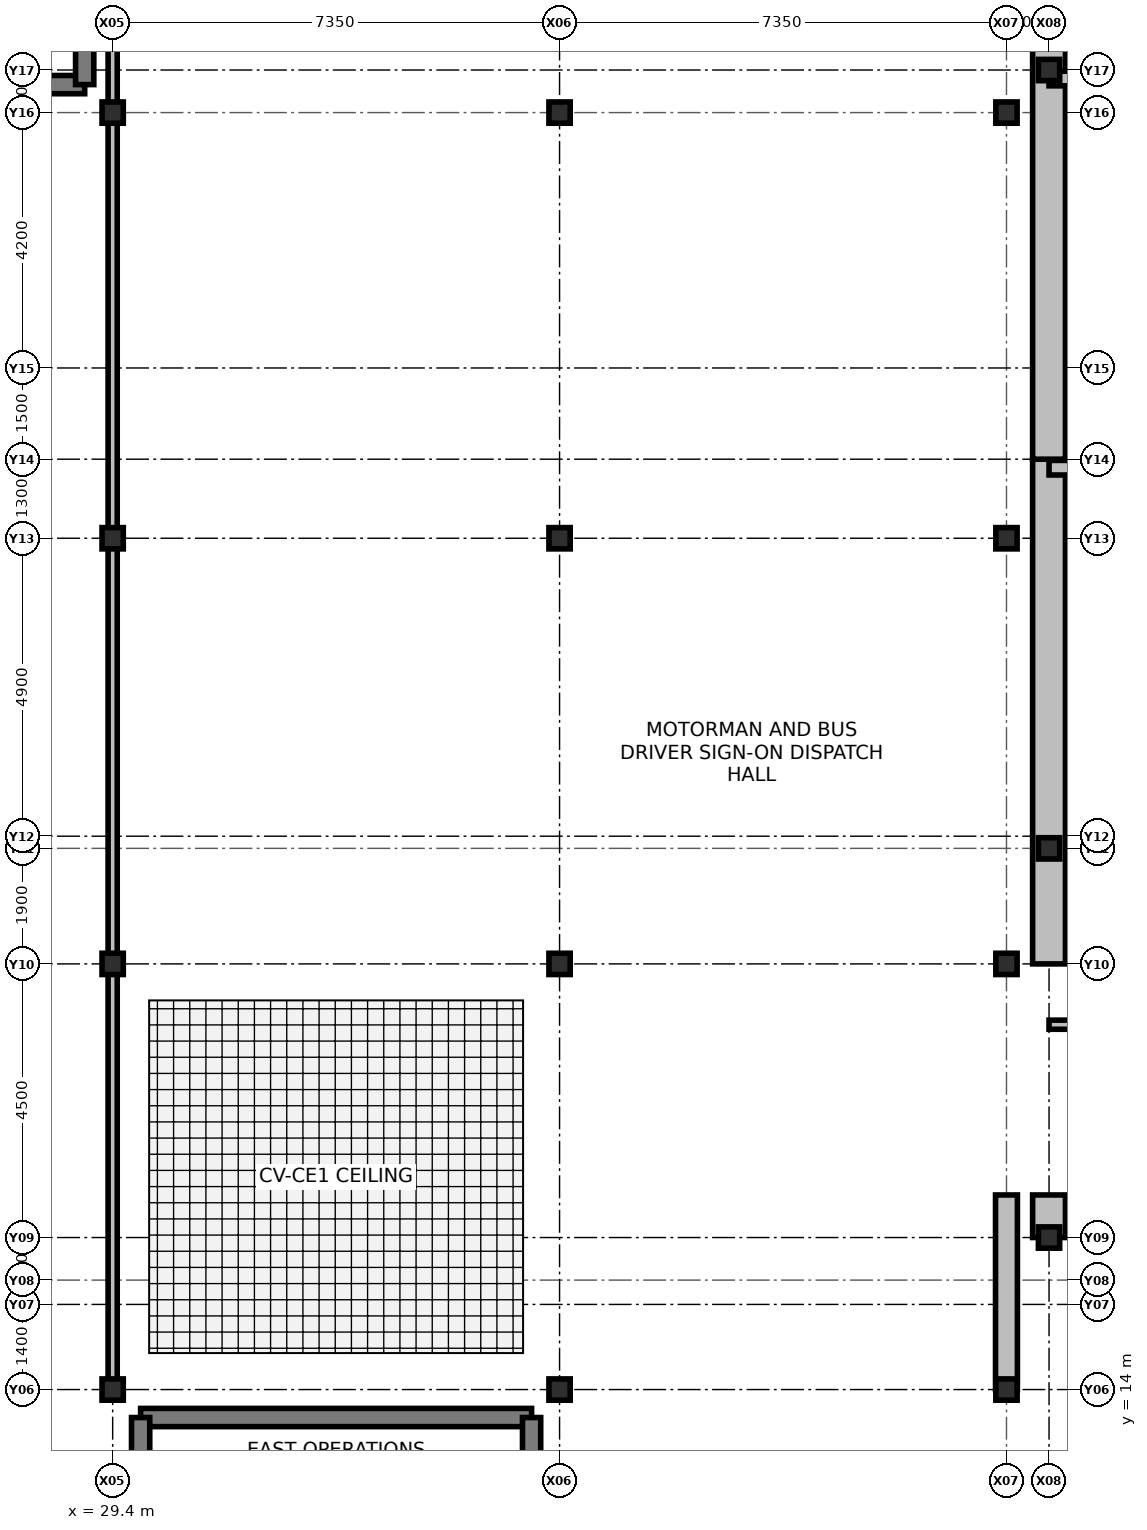
"""IFC4 building model, lengths in metres.
Left out: names, types, materials, properties, quantities, classifications, styles, units other than length and angle.
Written with IfcOpenShell. Run it as: python <this file> out.ifc"""

import sys

from ifc_helpers import new_model, si_unit, direction, frame, frame_2d, origin, origin_2d, place, context, subcontext, project, spatial, rectangle, i_section, extrude, element, fill, save


model = new_model("IFC4")
c1 = context("Model", 3, precision=1e-05, world=origin(), true_north=direction((0.0, 1.0)))
c2 = subcontext(c1, "Body", "Model", "MODEL_VIEW")
j1 = project(units=[si_unit("LENGTHUNIT", "METRE"), si_unit("PLANEANGLEUNIT", "RADIAN")], contexts=[c1])
p1 = place(None, origin())
s1 = spatial("IfcSite", under=j1, at=p1, CompositionType="ELEMENT")
p2 = place(p1, origin())
s2 = spatial("IfcBuilding", under=s1, at=p2, CompositionType="ELEMENT")
p3 = place(p2, frame((0.0, 0.0, 6.0)))
s3 = spatial("IfcBuildingStorey", under=s2, at=p3, CompositionType="ELEMENT", Elevation=6.0)
for number, where, z_axis, x_axis in (
    (1, (44.8, 16.5, 0.0), (0.0, 0.0, 1.0), (1.0, 0.0, 0.0)),
    (2, (44.8, 22.9, 0.0), (0.0, 0.0, 1.0), (1.0, 0.0, 0.0)),
):
    element("IfcColumn", number, at=place(p3, frame(where, z_axis=z_axis, x_axis=x_axis)), inside=s3, PredefinedType="COLUMN", context=c2, shape_type="SweptSolid", body=[
        extrude(i_section(OverallWidth=0.35, OverallDepth=0.35, WebThickness=0.012, FlangeThickness=0.019, at=origin_2d()), origin(), (0.0, 0.0, 1.0), 5.1),
    ])
p4 = place(p3, frame((44.8, 35.7, 0.0), z_axis=(0.0, 0.0, 1.0), x_axis=(1.0, 0.0, 0.0)))
e3 = element("IfcColumn", 3, at=p4, inside=s3, PredefinedType="COLUMN", context=c2, shape_type="SweptSolid", body=[
    extrude(i_section(OverallWidth=0.35, OverallDepth=0.35, WebThickness=0.012, FlangeThickness=0.019, at=origin_2d()), origin(), (0.0, 0.0, 1.0), 9.3),
])
for number, where, z_axis, x_axis in (
    (4, (29.4, 14.0, 0.0), (0.0, 0.0, 1.0), (1.0, 0.0, 0.0)),
    (5, (29.4, 21.0, 0.0), (0.0, 0.0, 1.0), (1.0, 0.0, 0.0)),
    (6, (29.4, 28.0, 0.0), (0.0, 0.0, 1.0), (1.0, 0.0, 0.0)),
    (7, (29.4, 35.0, 0.0), (0.0, 0.0, 1.0), (1.0, 0.0, 0.0)),
    (8, (36.75, 14.0, 0.0), (0.0, 0.0, 1.0), (1.0, 0.0, 0.0)),
    (9, (36.75, 21.0, 0.0), (0.0, 0.0, 1.0), (1.0, 0.0, 0.0)),
    (10, (36.75, 28.0, 0.0), (0.0, 0.0, 1.0), (1.0, 0.0, 0.0)),
    (11, (36.75, 35.0, 0.0), (0.0, 0.0, 1.0), (1.0, 0.0, 0.0)),
    (12, (44.1, 14.0, 0.0), (0.0, 0.0, 1.0), (1.0, 0.0, 0.0)),
    (13, (44.1, 21.0, 0.0), (0.0, 0.0, 1.0), (1.0, 0.0, 0.0)),
    (14, (44.1, 28.0, 0.0), (0.0, 0.0, 1.0), (1.0, 0.0, 0.0)),
    (15, (44.1, 35.0, 0.0), (0.0, 0.0, 1.0), (1.0, 0.0, 0.0)),
):
    element("IfcColumn", number, at=place(p3, frame(where, z_axis=z_axis, x_axis=x_axis)), inside=s3, PredefinedType="COLUMN", context=c2, shape_type="SweptSolid", body=[
        extrude(i_section(OverallWidth=0.35, OverallDepth=0.35, WebThickness=0.012, FlangeThickness=0.019, at=origin_2d()), origin(), (0.0, 0.0, 1.0), 5.1),
    ])
p5 = place(p3, frame((44.8, 16.5, 0.0), z_axis=(0.0, 0.0, 1.0), x_axis=(0.0, 1.0, 0.0)))
e16 = element("IfcWall", 16, at=p5, inside=s3, PredefinedType="SOLIDWALL", context=c2, shape_type="SweptSolid", body=[
    extrude(rectangle(XDim=0.7, YDim=0.54, at=frame_2d((0.35, 0.0))), origin(), (0.0, 0.0, 1.0), 2.58),
])
p6 = place(p3, frame((44.8, 21.0, 0.0), z_axis=(0.0, 0.0, 1.0), x_axis=(0.0, 1.0, 0.0)))
e17 = element("IfcWall", 17, at=p6, inside=s3, PredefinedType="SOLIDWALL", context=c2, shape_type="SweptSolid", body=[
    extrude(rectangle(XDim=8.3, YDim=0.54, at=frame_2d((4.15, 0.0))), origin(), (0.0, 0.0, 1.0), 2.58),
])
p7 = place(p3, frame((44.8, 29.3, -0.02), z_axis=(0.0, 0.0, 1.0), x_axis=(0.0, 1.0, 0.0)))
e18 = element("IfcWall", 18, at=p7, inside=s3, PredefinedType="SOLIDWALL", context=c2, shape_type="SweptSolid", body=[
    extrude(rectangle(XDim=25.6, YDim=0.54, at=frame_2d((12.8, 0.0))), origin(), (0.0, 0.0, 1.0), 2.6),
])
p8 = place(p3, frame((44.8, 29.16, 9.3), z_axis=(0.0, 0.0, 1.0), x_axis=(1.0, 0.0, 0.0)))
e19 = element("IfcWall", 19, at=p8, inside=s3, PredefinedType="SOLIDWALL", context=c2, shape_type="SweptSolid", body=[
    extrude(rectangle(XDim=16.8, YDim=0.24, at=frame_2d((8.4, 0.0))), origin(), (0.0, 0.0, 1.0), 2.75),
])
p9 = place(p8, frame((2.64, 0.0, 0.45)))
e20 = element("IfcOpeningElement", 20, at=p9, cuts=e19, PredefinedType="OPENING", context=c2, shape_type="SweptSolid", body=[
    extrude(rectangle(XDim=3.0, YDim=1.4, at=frame_2d((1.5, 0.7))), frame((0.0, 0.13, 0.0), z_axis=(0.0, -1.0, 0.0), x_axis=(1.0, 0.0, 0.0)), (0.0, 0.0, 1.0), 0.26),
])
p10 = place(p8, frame((9.94, 0.0, 0.45)))
e21 = element("IfcOpeningElement", 21, at=p10, cuts=e19, PredefinedType="OPENING", context=c2, shape_type="SweptSolid", body=[
    extrude(rectangle(XDim=3.0, YDim=1.4, at=frame_2d((1.5, 0.7))), frame((0.0, 0.13, 0.0), z_axis=(0.0, -1.0, 0.0), x_axis=(1.0, 0.0, 0.0)), (0.0, 0.0, 1.0), 0.26),
])
p11 = place(p3, frame((44.8, 35.56, 9.3), z_axis=(0.0, 0.0, 1.0), x_axis=(1.0, 0.0, 0.0)))
e22 = element("IfcWall", 22, at=p11, inside=s3, PredefinedType="SOLIDWALL", context=c2, shape_type="SweptSolid", body=[
    extrude(rectangle(XDim=16.8, YDim=0.24, at=frame_2d((8.4, 0.0))), origin(), (0.0, 0.0, 1.0), 2.75),
])
p12 = place(p11, frame((2.64, 0.0, 0.45)))
e23 = element("IfcOpeningElement", 23, at=p12, cuts=e22, PredefinedType="OPENING", context=c2, shape_type="SweptSolid", body=[
    extrude(rectangle(XDim=3.6, YDim=1.4, at=frame_2d((1.8, 0.7))), frame((0.0, 0.13, 0.0), z_axis=(0.0, -1.0, 0.0), x_axis=(1.0, 0.0, 0.0)), (0.0, 0.0, 1.0), 0.26),
])
p13 = place(p11, frame((9.94, 0.0, 0.45)))
e24 = element("IfcOpeningElement", 24, at=p13, cuts=e22, PredefinedType="OPENING", context=c2, shape_type="SweptSolid", body=[
    extrude(rectangle(XDim=3.6, YDim=1.4, at=frame_2d((1.8, 0.7))), frame((0.0, 0.13, 0.0), z_axis=(0.0, -1.0, 0.0), x_axis=(1.0, 0.0, 0.0)), (0.0, 0.0, 1.0), 0.26),
])
p14 = place(p3, frame((44.1, 14.0, 0.0), z_axis=(0.0, 0.0, 1.0), x_axis=(0.0, 1.0, 0.0)))
e25 = element("IfcWall", 25, at=p14, inside=s3, PredefinedType="SOLIDWALL", context=c2, shape_type="SweptSolid", body=[
    extrude(rectangle(XDim=3.2, YDim=0.36, at=frame_2d((1.6, 0.0))), origin(), (0.0, 0.0, 1.0), 2.9),
])
p15 = place(p3, frame((22.51, 35.46, 0.0), z_axis=(0.0, 0.0, 1.0), x_axis=(1.0, 0.0, 0.0)))
e26 = element("IfcWall", 26, at=p15, inside=s3, PredefinedType="SHEAR", context=c2, shape_type="SweptSolid", body=[
    extrude(rectangle(XDim=6.43, YDim=0.3, at=frame_2d((3.215, 0.0))), origin(), (0.0, 0.0, 1.0), 4.82),
])
p16 = place(p3, frame((28.94, 35.46, 0.0), z_axis=(0.0, 0.0, 1.0), x_axis=(0.0, 1.0, 0.0)))
e27 = element("IfcWall", 27, at=p16, inside=s3, PredefinedType="SHEAR", context=c2, shape_type="SweptSolid", body=[
    extrude(rectangle(XDim=6.08, YDim=0.3, at=frame_2d((3.04, 0.0))), origin(), (0.0, 0.0, 1.0), 4.82),
])
p17 = place(p3, frame((29.86, 13.54, 0.0), z_axis=(0.0, 0.0, 1.0), x_axis=(1.0, 0.0, 0.0)))
e28 = element("IfcWall", 28, at=p17, inside=s3, PredefinedType="SHEAR", context=c2, shape_type="SweptSolid", body=[
    extrude(rectangle(XDim=6.43, YDim=0.3, at=frame_2d((3.215, 0.0))), origin(), (0.0, 0.0, 1.0), 4.82),
])
p18 = place(p17, frame((0.55, 0.0, 0.0)))
e29 = element("IfcOpeningElement", 29, at=p18, cuts=e28, PredefinedType="OPENING", context=c2, shape_type="SweptSolid", body=[
    extrude(rectangle(XDim=1.5, YDim=2.2, at=frame_2d((0.75, 1.1))), frame((0.0, 0.16, 0.0), z_axis=(0.0, -1.0, 0.0), x_axis=(1.0, 0.0, 0.0)), (0.0, 0.0, 1.0), 0.32),
])
for number, where, z_axis, x_axis in (
    (30, (29.86, 7.46, 0.0), (0.0, 0.0, 1.0), (0.0, 1.0, 0.0)),
    (31, (36.29, 7.46, 0.0), (0.0, 0.0, 1.0), (0.0, 1.0, 0.0)),
):
    element("IfcWall", number, at=place(p3, frame(where, z_axis=z_axis, x_axis=x_axis)), inside=s3, PredefinedType="SHEAR", context=c2, shape_type="SweptSolid", body=[
        extrude(rectangle(XDim=6.08, YDim=0.3, at=frame_2d((3.04, 0.0))), origin(), (0.0, 0.0, 1.0), 4.82),
    ])
p19 = place(p3, frame((44.8, 20.0, 0.0), z_axis=(0.0, 0.0, 1.0), x_axis=(1.0, 0.0, 0.0)))
e32 = element("IfcWall", 32, at=p19, inside=s3, PredefinedType="PARTITIONING", context=c2, shape_type="SweptSolid", body=[
    extrude(rectangle(XDim=8.4, YDim=0.15, at=frame_2d((4.2, 0.0))), origin(), (0.0, 0.0, 1.0), 4.05),
])
p20 = place(p19, frame((3.2, 0.0, 0.0)))
e33 = element("IfcOpeningElement", 33, at=p20, cuts=e32, PredefinedType="OPENING", context=c2, shape_type="SweptSolid", body=[
    extrude(rectangle(XDim=1.1, YDim=2.1, at=frame_2d((0.55, 1.05))), frame((0.0, 0.085, 0.0), z_axis=(0.0, -1.0, 0.0), x_axis=(1.0, 0.0, 0.0)), (0.0, 0.0, 1.0), 0.17),
])
p21 = place(p3, frame((29.4, 14.0, 0.0), z_axis=(0.0, 0.0, 1.0), x_axis=(0.0, 1.0, 0.0)))
e34 = element("IfcWall", 34, at=p21, inside=s3, PredefinedType="PARTITIONING", context=c2, shape_type="SweptSolid", body=[
    extrude(rectangle(XDim=49.0, YDim=0.15, at=frame_2d((24.5, 0.0))), origin(), (0.0, 0.0, 1.0), 4.05),
])
p22 = place(p21, frame((10.0, 0.0, 0.0)))
e35 = element("IfcOpeningElement", 35, at=p22, cuts=e34, PredefinedType="OPENING", context=c2, shape_type="SweptSolid", body=[
    extrude(rectangle(XDim=1.4, YDim=2.2, at=frame_2d((0.7, 1.1))), frame((0.0, 0.085, 0.0), z_axis=(0.0, -1.0, 0.0), x_axis=(1.0, 0.0, 0.0)), (0.0, 0.0, 1.0), 0.17),
])
p23 = place(p21, frame((31.0, 0.0, 0.0)))
e36 = element("IfcOpeningElement", 36, at=p23, cuts=e34, PredefinedType="OPENING", context=c2, shape_type="SweptSolid", body=[
    extrude(rectangle(XDim=1.25, YDim=2.15, at=frame_2d((0.625, 1.075))), frame((0.0, 0.085, 0.0), z_axis=(0.0, -1.0, 0.0), x_axis=(1.0, 0.0, 0.0)), (0.0, 0.0, 1.0), 0.17),
])
p24 = place(p18, origin())
e37 = element("IfcDoor", 37, at=p24, inside=s3, OperationType="DOUBLE_DOOR_SINGLE_SWING", PredefinedType="DOOR", context=c2, shape_type="SweptSolid", body=[
    extrude(rectangle(XDim=1.5, YDim=2.2, at=frame_2d((0.75, 1.1))), frame((0.0, 0.025, 0.0), z_axis=(0.0, -1.0, 0.0), x_axis=(1.0, 0.0, 0.0)), (0.0, 0.0, 1.0), 0.05),
])
fill(e29, e37)
p25 = place(p22, origin())
e38 = element("IfcDoor", 38, at=p25, inside=s3, OperationType="DOUBLE_DOOR_SINGLE_SWING", PredefinedType="DOOR", context=c2, shape_type="SweptSolid", body=[
    extrude(rectangle(XDim=1.4, YDim=2.2, at=frame_2d((0.7, 1.1))), frame((0.0, 0.025, 0.0), z_axis=(0.0, -1.0, 0.0), x_axis=(1.0, 0.0, 0.0)), (0.0, 0.0, 1.0), 0.05),
])
fill(e35, e38)
save(model, sys.argv[1])
